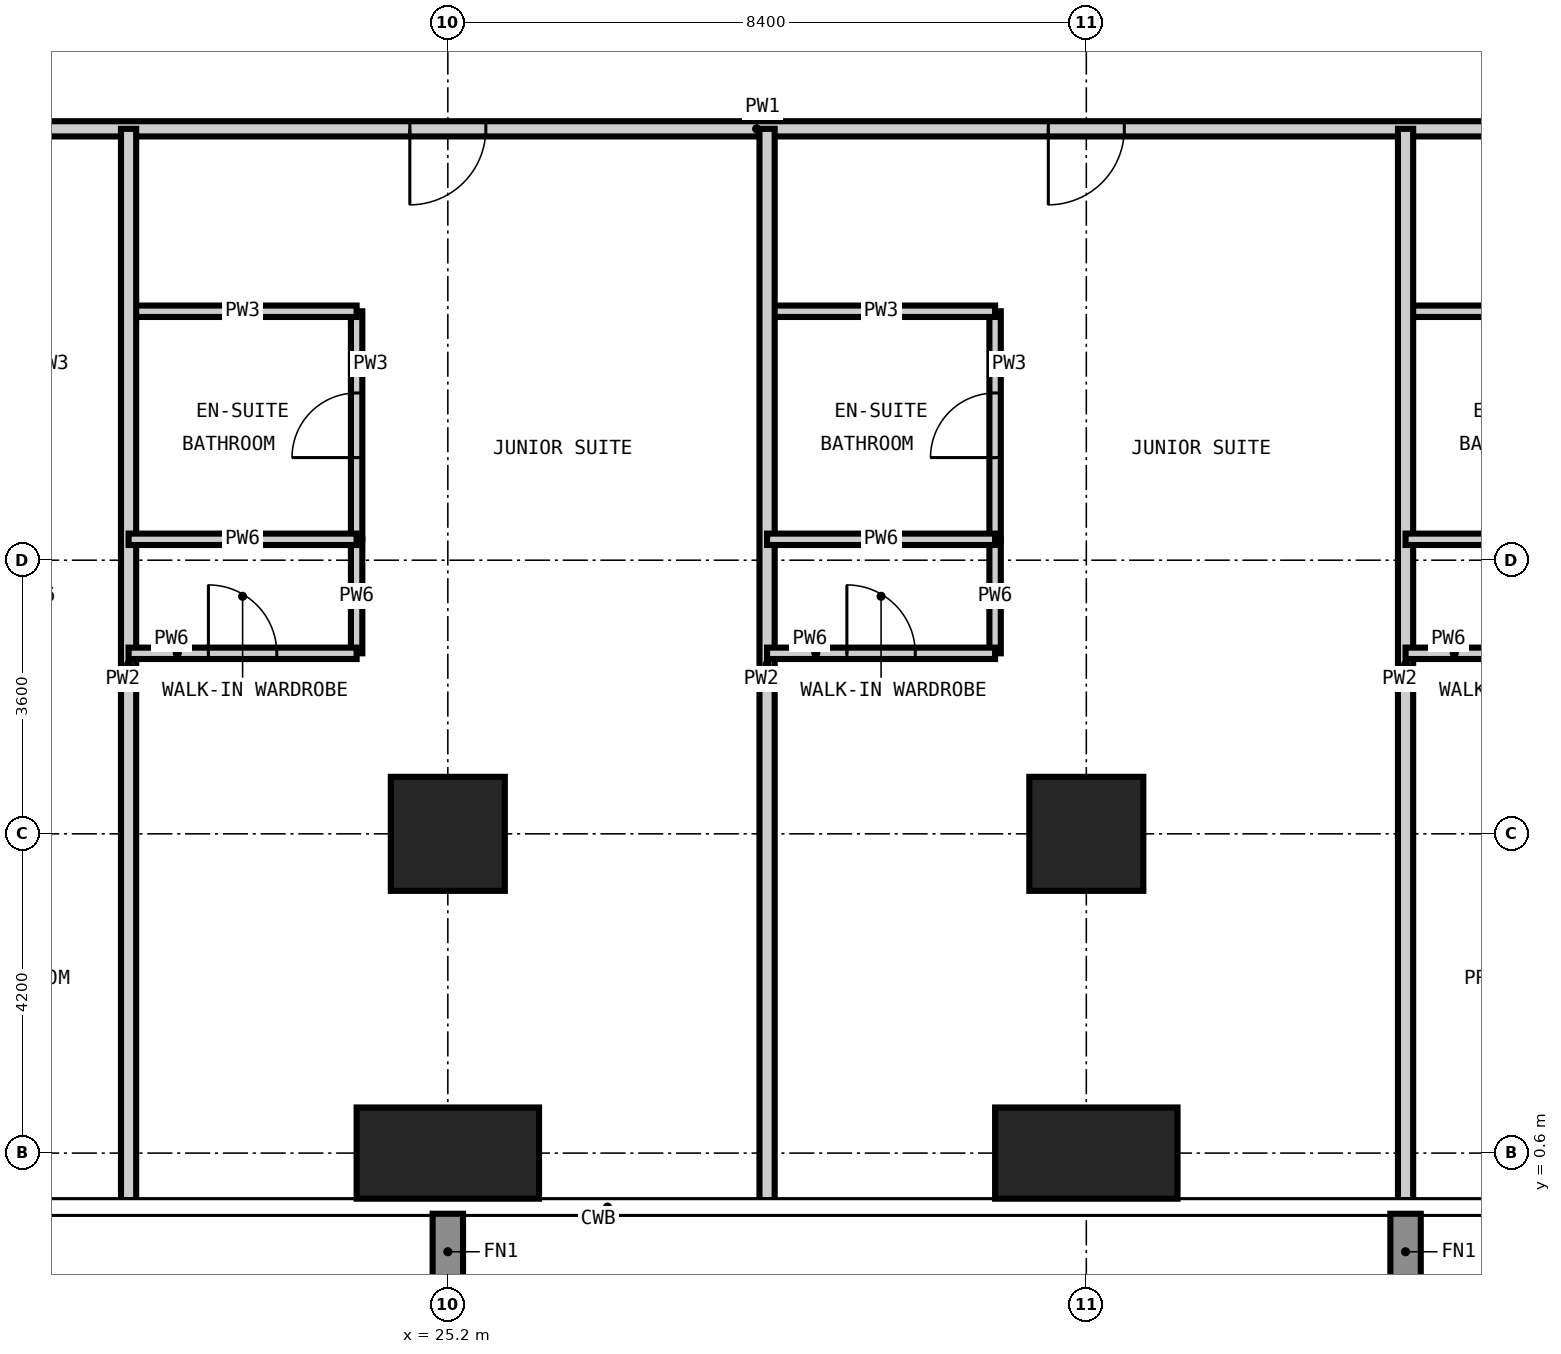
"""IFC4 building model, lengths in metres.
Left out: names, types, materials, properties, quantities, classifications, styles, units other than length and angle.
Written with IfcOpenShell. Run it as: python <this file> out.ifc"""

import sys

from ifc_helpers import new_model, si_unit, direction, frame, frame_2d, origin, origin_2d, place, context, subcontext, project, spatial, rectangle, extrude, element, fill, save


model = new_model("IFC4")
c1 = context("Model", 3, precision=1e-05, world=origin(), true_north=direction((0.0, 1.0)))
c2 = subcontext(c1, "Body", "Model", "MODEL_VIEW")
j1 = project(units=[si_unit("LENGTHUNIT", "METRE"), si_unit("PLANEANGLEUNIT", "RADIAN")], contexts=[c1])
p1 = place(None, origin())
s1 = spatial("IfcSite", under=j1, at=p1, CompositionType="ELEMENT")
p2 = place(p1, origin())
s2 = spatial("IfcBuilding", under=s1, at=p2, CompositionType="ELEMENT")
p3 = place(p2, frame((0.0, 0.0, 100.8)))
s3 = spatial("IfcBuildingStorey", under=s2, at=p3, CompositionType="ELEMENT", Elevation=100.8)
p4 = place(p3, frame((25.2, 0.6, -0.35), z_axis=(0.0, 0.0, 1.0), x_axis=(1.0, 0.0, 0.0)))
e1 = element("IfcColumn", 1, at=p4, inside=s3, PredefinedType="COLUMN", context=c2, shape_type="SweptSolid", body=[
    extrude(rectangle(XDim=2.4, YDim=1.2, at=origin_2d()), origin(), (0.0, 0.0, 1.0), 3.6),
])
p5 = place(p3, frame((25.2, 4.8, -0.35), z_axis=(0.0, 0.0, 1.0), x_axis=(1.0, 0.0, 0.0)))
e2 = element("IfcColumn", 2, at=p5, inside=s3, PredefinedType="COLUMN", context=c2, shape_type="SweptSolid", body=[
    extrude(rectangle(XDim=1.5, YDim=1.5, at=origin_2d()), origin(), (0.0, 0.0, 1.0), 3.6),
])
p6 = place(p3, frame((33.6, 0.6, -0.35), z_axis=(0.0, 0.0, 1.0), x_axis=(1.0, 0.0, 0.0)))
e3 = element("IfcColumn", 3, at=p6, inside=s3, PredefinedType="COLUMN", context=c2, shape_type="SweptSolid", body=[
    extrude(rectangle(XDim=2.4, YDim=1.2, at=origin_2d()), origin(), (0.0, 0.0, 1.0), 3.6),
])
p7 = place(p3, frame((33.6, 4.8, -0.35), z_axis=(0.0, 0.0, 1.0), x_axis=(1.0, 0.0, 0.0)))
e4 = element("IfcColumn", 4, at=p7, inside=s3, PredefinedType="COLUMN", context=c2, shape_type="SweptSolid", body=[
    extrude(rectangle(XDim=1.5, YDim=1.5, at=origin_2d()), origin(), (0.0, 0.0, 1.0), 3.6),
])
p8 = place(p3, frame((24.0, 8.675, 0.0), z_axis=(0.0, 0.0, 1.0), x_axis=(0.0, 1.0, 0.0)))
e5 = element("IfcWall", 5, at=p8, inside=s3, PredefinedType="PARTITIONING", context=c2, shape_type="SweptSolid", body=[
    extrude(rectangle(XDim=3.0, YDim=0.15, at=frame_2d((1.5, 0.0))), origin(), (0.0, 0.0, 1.0), 3.25),
])
p9 = place(p8, frame((1.075, 0.0, 0.0)))
e6 = element("IfcOpeningElement", 6, at=p9, cuts=e5, PredefinedType="OPENING", context=c2, shape_type="SweptSolid", body=[
    extrude(rectangle(XDim=0.85, YDim=2.1, at=frame_2d((0.425, 1.05))), frame((0.0, 0.085, 0.0), z_axis=(0.0, -1.0, 0.0), x_axis=(1.0, 0.0, 0.0)), (0.0, 0.0, 1.0), 0.17),
])
p10 = place(p3, frame((32.4, 8.675, 0.0), z_axis=(0.0, 0.0, 1.0), x_axis=(0.0, 1.0, 0.0)))
e7 = element("IfcWall", 7, at=p10, inside=s3, PredefinedType="PARTITIONING", context=c2, shape_type="SweptSolid", body=[
    extrude(rectangle(XDim=3.0, YDim=0.15, at=frame_2d((1.5, 0.0))), origin(), (0.0, 0.0, 1.0), 3.25),
])
p11 = place(p10, frame((1.075, 0.0, 0.0)))
e8 = element("IfcOpeningElement", 8, at=p11, cuts=e7, PredefinedType="OPENING", context=c2, shape_type="SweptSolid", body=[
    extrude(rectangle(XDim=0.85, YDim=2.1, at=frame_2d((0.425, 1.05))), frame((0.0, 0.085, 0.0), z_axis=(0.0, -1.0, 0.0), x_axis=(1.0, 0.0, 0.0)), (0.0, 0.0, 1.0), 0.17),
])
for number, where, z_axis, x_axis in (
    (9, (21.0, 11.675, 0.0), (0.0, 0.0, 1.0), (1.0, 0.0, 0.0)),
    (10, (29.4, 11.675, 0.0), (0.0, 0.0, 1.0), (1.0, 0.0, 0.0)),
    (11, (37.8, 11.675, 0.0), (0.0, 0.0, 1.0), (1.0, 0.0, 0.0)),
):
    element("IfcWall", number, at=place(p3, frame(where, z_axis=z_axis, x_axis=x_axis)), inside=s3, PredefinedType="PARTITIONING", context=c2, shape_type="SweptSolid", body=[
        extrude(rectangle(XDim=3.0, YDim=0.15, at=frame_2d((1.5, 0.0))), origin(), (0.0, 0.0, 1.0), 3.25),
    ])
p12 = place(p3, frame((45.925, 14.075, 0.0), z_axis=(0.0, 0.0, 1.0), x_axis=(-1.0, 0.0, 0.0)))
e12 = element("IfcWall", 12, at=p12, inside=s3, PredefinedType="PARTITIONING", context=c2, shape_type="SweptSolid", body=[
    extrude(rectangle(XDim=33.325, YDim=0.2, at=frame_2d((16.663, 0.0))), origin(), (0.0, 0.0, 1.0), 3.25),
])
p13 = place(p12, frame((26.525, 0.0, 0.0)))
e13 = element("IfcOpeningElement", 13, at=p13, cuts=e12, PredefinedType="OPENING", context=c2, shape_type="SweptSolid", body=[
    extrude(rectangle(XDim=1.0, YDim=2.2, at=frame_2d((0.5, 1.1))), frame((0.0, 0.11, 0.0), z_axis=(0.0, -1.0, 0.0), x_axis=(1.0, 0.0, 0.0)), (0.0, 0.0, 1.0), 0.22),
])
p14 = place(p12, frame((20.225, 0.0, 0.0)))
e14 = element("IfcOpeningElement", 14, at=p14, cuts=e12, PredefinedType="OPENING", context=c2, shape_type="SweptSolid", body=[
    extrude(rectangle(XDim=1.0, YDim=2.2, at=frame_2d((0.5, 1.1))), frame((0.0, 0.11, 0.0), z_axis=(0.0, -1.0, 0.0), x_axis=(1.0, 0.0, 0.0)), (0.0, 0.0, 1.0), 0.22),
])
p15 = place(p12, frame((11.825, 0.0, 0.0)))
e15 = element("IfcOpeningElement", 15, at=p15, cuts=e12, PredefinedType="OPENING", context=c2, shape_type="SweptSolid", body=[
    extrude(rectangle(XDim=1.0, YDim=2.2, at=frame_2d((0.5, 1.1))), frame((0.0, 0.11, 0.0), z_axis=(0.0, -1.0, 0.0), x_axis=(1.0, 0.0, 0.0)), (0.0, 0.0, 1.0), 0.22),
])
p16 = place(p12, frame((5.525, 0.0, 0.0)))
e16 = element("IfcOpeningElement", 16, at=p16, cuts=e12, PredefinedType="OPENING", context=c2, shape_type="SweptSolid", body=[
    extrude(rectangle(XDim=1.0, YDim=2.2, at=frame_2d((0.5, 1.1))), frame((0.0, 0.11, 0.0), z_axis=(0.0, -1.0, 0.0), x_axis=(1.0, 0.0, 0.0)), (0.0, 0.0, 1.0), 0.22),
])
for number, where, z_axis, x_axis in (
    (17, (21.0, -0.018, 0.0), (0.0, 0.0, 1.0), (0.0, 1.0, 0.0)),
    (18, (29.4, -0.018, 0.0), (0.0, 0.0, 1.0), (0.0, 1.0, 0.0)),
    (19, (37.8, -0.018, 0.0), (0.0, 0.0, 1.0), (0.0, 1.0, 0.0)),
):
    element("IfcWall", number, at=place(p3, frame(where, z_axis=z_axis, x_axis=x_axis)), inside=s3, PredefinedType="PARTITIONING", context=c2, shape_type="SweptSolid", body=[
        extrude(rectangle(XDim=14.093, YDim=0.2, at=frame_2d((7.046, 0.0))), origin(), (0.0, 0.0, 1.0), 3.25),
    ])
for number, where, z_axis, x_axis in (
    (20, (24.0, 7.175, 0.0), (0.0, 0.0, 1.0), (0.0, 1.0, 0.0)),
    (21, (32.4, 7.175, 0.0), (0.0, 0.0, 1.0), (0.0, 1.0, 0.0)),
):
    element("IfcWall", number, at=place(p3, frame(where, z_axis=z_axis, x_axis=x_axis)), inside=s3, PredefinedType="PARTITIONING", context=c2, shape_type="SweptSolid", body=[
        extrude(rectangle(XDim=1.5, YDim=0.15, at=frame_2d((0.75, 0.0))), origin(), (0.0, 0.0, 1.0), 3.25),
    ])
p17 = place(p3, frame((21.0, 7.175, 0.0), z_axis=(0.0, 0.0, 1.0), x_axis=(1.0, 0.0, 0.0)))
e22 = element("IfcWall", 22, at=p17, inside=s3, PredefinedType="PARTITIONING", context=c2, shape_type="SweptSolid", body=[
    extrude(rectangle(XDim=3.0, YDim=0.15, at=frame_2d((1.5, 0.0))), origin(), (0.0, 0.0, 1.0), 3.25),
])
p18 = place(p17, frame((1.05, 0.0, 0.0)))
e23 = element("IfcOpeningElement", 23, at=p18, cuts=e22, PredefinedType="OPENING", context=c2, shape_type="SweptSolid", body=[
    extrude(rectangle(XDim=0.9, YDim=2.1, at=frame_2d((0.45, 1.05))), frame((0.0, 0.085, 0.0), z_axis=(0.0, -1.0, 0.0), x_axis=(1.0, 0.0, 0.0)), (0.0, 0.0, 1.0), 0.17),
])
p19 = place(p3, frame((29.4, 7.175, 0.0), z_axis=(0.0, 0.0, 1.0), x_axis=(1.0, 0.0, 0.0)))
e24 = element("IfcWall", 24, at=p19, inside=s3, PredefinedType="PARTITIONING", context=c2, shape_type="SweptSolid", body=[
    extrude(rectangle(XDim=3.0, YDim=0.15, at=frame_2d((1.5, 0.0))), origin(), (0.0, 0.0, 1.0), 3.25),
])
p20 = place(p19, frame((1.05, 0.0, 0.0)))
e25 = element("IfcOpeningElement", 25, at=p20, cuts=e24, PredefinedType="OPENING", context=c2, shape_type="SweptSolid", body=[
    extrude(rectangle(XDim=0.9, YDim=2.1, at=frame_2d((0.45, 1.05))), frame((0.0, 0.085, 0.0), z_axis=(0.0, -1.0, 0.0), x_axis=(1.0, 0.0, 0.0)), (0.0, 0.0, 1.0), 0.17),
])
p21 = place(p3, frame((37.8, 7.175, 0.0), z_axis=(0.0, 0.0, 1.0), x_axis=(1.0, 0.0, 0.0)))
e26 = element("IfcWall", 26, at=p21, inside=s3, PredefinedType="PARTITIONING", context=c2, shape_type="SweptSolid", body=[
    extrude(rectangle(XDim=3.0, YDim=0.15, at=frame_2d((1.5, 0.0))), origin(), (0.0, 0.0, 1.0), 3.25),
])
p22 = place(p21, frame((1.05, 0.0, 0.0)))
e27 = element("IfcOpeningElement", 27, at=p22, cuts=e26, PredefinedType="OPENING", context=c2, shape_type="SweptSolid", body=[
    extrude(rectangle(XDim=0.9, YDim=2.1, at=frame_2d((0.45, 1.05))), frame((0.0, 0.085, 0.0), z_axis=(0.0, -1.0, 0.0), x_axis=(1.0, 0.0, 0.0)), (0.0, 0.0, 1.0), 0.17),
])
for number, where, z_axis, x_axis in (
    (28, (21.0, 8.675, 0.0), (0.0, 0.0, 1.0), (1.0, 0.0, 0.0)),
    (29, (29.4, 8.675, 0.0), (0.0, 0.0, 1.0), (1.0, 0.0, 0.0)),
    (30, (37.8, 8.675, 0.0), (0.0, 0.0, 1.0), (1.0, 0.0, 0.0)),
):
    element("IfcWall", number, at=place(p3, frame(where, z_axis=z_axis, x_axis=x_axis)), inside=s3, PredefinedType="PARTITIONING", context=c2, shape_type="SweptSolid", body=[
        extrude(rectangle(XDim=3.0, YDim=0.15, at=frame_2d((1.5, 0.0))), origin(), (0.0, 0.0, 1.0), 3.25),
    ])
p23 = place(p14, origin())
e31 = element("IfcDoor", 31, at=p23, inside=s3, OperationType="SINGLE_SWING_RIGHT", PredefinedType="DOOR", context=c2, shape_type="SweptSolid", body=[
    extrude(rectangle(XDim=1.0, YDim=2.2, at=frame_2d((0.5, 1.1))), frame((0.0, 0.025, 0.0), z_axis=(0.0, -1.0, 0.0), x_axis=(1.0, 0.0, 0.0)), (0.0, 0.0, 1.0), 0.05),
])
fill(e14, e31)
p24 = place(p9, origin())
e32 = element("IfcDoor", 32, at=p24, inside=s3, OperationType="SINGLE_SWING_LEFT", PredefinedType="DOOR", context=c2, shape_type="SweptSolid", body=[
    extrude(rectangle(XDim=0.85, YDim=2.1, at=frame_2d((0.425, 1.05))), frame((0.0, 0.025, 0.0), z_axis=(0.0, -1.0, 0.0), x_axis=(1.0, 0.0, 0.0)), (0.0, 0.0, 1.0), 0.05),
])
fill(e6, e32)
p25 = place(p18, origin())
e33 = element("IfcDoor", 33, at=p25, inside=s3, OperationType="SINGLE_SWING_LEFT", PredefinedType="DOOR", context=c2, shape_type="SweptSolid", body=[
    extrude(rectangle(XDim=0.9, YDim=2.1, at=frame_2d((0.45, 1.05))), frame((0.0, 0.025, 0.0), z_axis=(0.0, -1.0, 0.0), x_axis=(1.0, 0.0, 0.0)), (0.0, 0.0, 1.0), 0.05),
])
fill(e23, e33)
p26 = place(p15, origin())
e34 = element("IfcDoor", 34, at=p26, inside=s3, OperationType="SINGLE_SWING_RIGHT", PredefinedType="DOOR", context=c2, shape_type="SweptSolid", body=[
    extrude(rectangle(XDim=1.0, YDim=2.2, at=frame_2d((0.5, 1.1))), frame((0.0, 0.025, 0.0), z_axis=(0.0, -1.0, 0.0), x_axis=(1.0, 0.0, 0.0)), (0.0, 0.0, 1.0), 0.05),
])
fill(e15, e34)
p27 = place(p11, origin())
e35 = element("IfcDoor", 35, at=p27, inside=s3, OperationType="SINGLE_SWING_LEFT", PredefinedType="DOOR", context=c2, shape_type="SweptSolid", body=[
    extrude(rectangle(XDim=0.85, YDim=2.1, at=frame_2d((0.425, 1.05))), frame((0.0, 0.025, 0.0), z_axis=(0.0, -1.0, 0.0), x_axis=(1.0, 0.0, 0.0)), (0.0, 0.0, 1.0), 0.05),
])
fill(e8, e35)
p28 = place(p20, origin())
e36 = element("IfcDoor", 36, at=p28, inside=s3, OperationType="SINGLE_SWING_LEFT", PredefinedType="DOOR", context=c2, shape_type="SweptSolid", body=[
    extrude(rectangle(XDim=0.9, YDim=2.1, at=frame_2d((0.45, 1.05))), frame((0.0, 0.025, 0.0), z_axis=(0.0, -1.0, 0.0), x_axis=(1.0, 0.0, 0.0)), (0.0, 0.0, 1.0), 0.05),
])
fill(e25, e36)
save(model, sys.argv[1])
